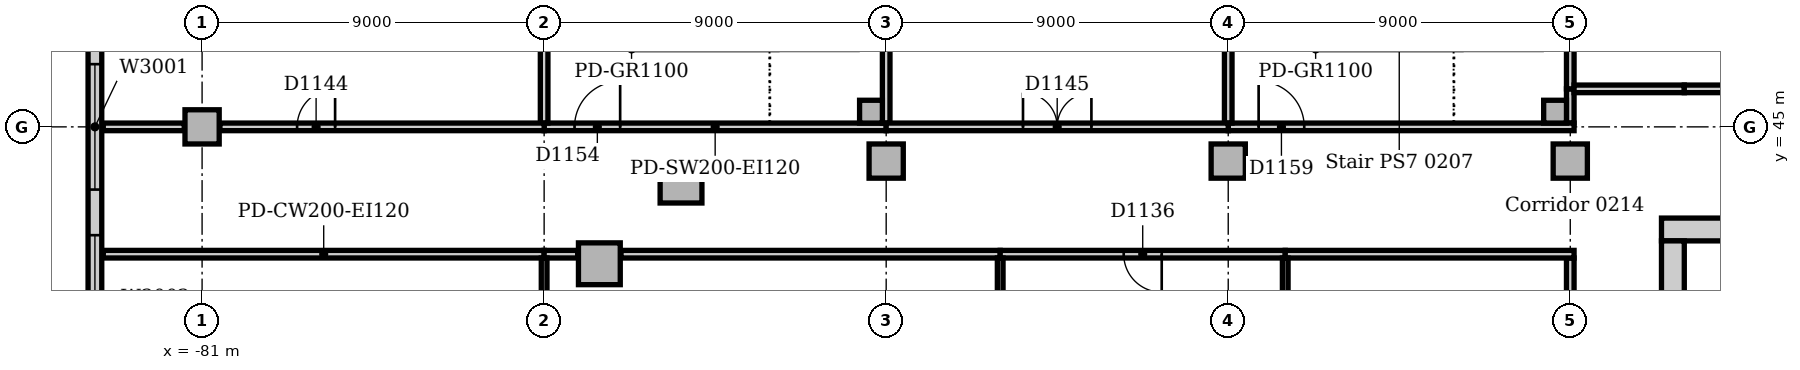
"""IFC4 building model, lengths in metres.
Left out: names, types, materials, properties, quantities, classifications, styles, units other than length and angle.
Written with IfcOpenShell. Run it as: python <this file> out.ifc"""

import sys

from ifc_helpers import new_model, si_unit, direction, frame, frame_2d, origin, origin_2d, place, context, subcontext, project, spatial, rectangle, extrude, element, fill, save


model = new_model("IFC4")
c1 = context("Model", 3, precision=1e-05, world=origin(), true_north=direction((0.0, 1.0)))
c2 = subcontext(c1, "Body", "Model", "MODEL_VIEW")
j1 = project(units=[si_unit("LENGTHUNIT", "METRE"), si_unit("PLANEANGLEUNIT", "RADIAN")], contexts=[c1])
p1 = place(None, origin())
s1 = spatial("IfcSite", under=j1, at=p1, CompositionType="ELEMENT")
p2 = place(p1, origin())
s2 = spatial("IfcBuilding", under=s1, at=p2, CompositionType="ELEMENT")
p3 = place(p2, frame((0.0, 0.0, 11.0)))
s3 = spatial("IfcBuildingStorey", under=s2, at=p3, CompositionType="ELEMENT", Elevation=11.0)
p4 = place(p3, frame((-30.9, 42.3, 0.0), z_axis=(0.0, 0.0, 1.0), x_axis=(-1.0, 0.0, 0.0)))
e1 = element("IfcWall", 1, at=p4, inside=s3, PredefinedType="SOLIDWALL", context=c2, shape_type="SweptSolid", body=[
    extrude(rectangle(XDim=11.7, YDim=0.6, at=frame_2d((5.85, 0.0))), origin(), (0.0, 0.0, 1.0), 5.0),
])
p5 = place(p3, frame((-42.3, 42.0, 0.0), z_axis=(0.0, 0.0, 1.0), x_axis=(0.0, -1.0, 0.0)))
e2 = element("IfcWall", 2, at=p5, inside=s3, PredefinedType="SOLIDWALL", context=c2, shape_type="SweptSolid", body=[
    extrude(rectangle(XDim=11.5, YDim=0.6, at=frame_2d((5.75, 0.0))), origin(), (0.0, 0.0, 1.0), 5.0),
])
p6 = place(p5, frame((8.85, 0.0, 0.0)))
e3 = element("IfcOpeningElement", 3, at=p6, cuts=e2, PredefinedType="OPENING", context=c2, shape_type="SweptSolid", body=[
    extrude(rectangle(XDim=1.8, YDim=2.1, at=frame_2d((0.9, 1.05))), frame((0.0, 0.31, 0.0), z_axis=(0.0, -1.0, 0.0), x_axis=(1.0, 0.0, 0.0)), (0.0, 0.0, 1.0), 0.62),
])
for number, where, z_axis, x_axis in (
    (4, (-68.398, 43.547, 0.0), (0.0, 0.0, 1.0), (1.0, 0.0, 0.0)),
    (5, (-70.547, 41.398, 0.0), (0.0, 0.0, 1.0), (1.0, 0.0, 0.0)),
):
    element("IfcColumn", number, at=place(p3, frame(where, z_axis=z_axis, x_axis=x_axis)), inside=s3, PredefinedType="COLUMN", context=c2, shape_type="SweptSolid", body=[
        extrude(rectangle(XDim=1.1, YDim=1.1, at=origin_2d()), origin(), (0.0, 0.0, 1.0), 4.7),
    ])
for number, where, z_axis, x_axis in (
    (6, (-63.0, 44.1, 0.0), (0.0, 0.0, 1.0), (1.0, 0.0, 0.0)),
    (7, (-54.0, 44.1, 0.0), (0.0, 0.0, 1.0), (1.0, 0.0, 0.0)),
    (8, (-45.0, 44.1, 0.0), (0.0, 0.0, 1.0), (1.0, 0.0, 0.0)),
    (9, (-81.0, 45.0, 0.0), (0.0, 0.0, 1.0), (1.0, 0.0, 0.0)),
):
    element("IfcColumn", number, at=place(p3, frame(where, z_axis=z_axis, x_axis=x_axis)), inside=s3, PredefinedType="COLUMN", context=c2, shape_type="SweptSolid", body=[
        extrude(rectangle(XDim=0.9, YDim=0.9, at=origin_2d()), origin(), (0.0, 0.0, 1.0), 4.7),
    ])
p7 = place(p3, frame((-83.82, 54.0, 0.0), z_axis=(0.0, 0.0, 1.0), x_axis=(0.0, -1.0, 0.0)))
e10 = element("IfcWall", 10, at=p7, inside=s3, PredefinedType="STANDARD", context=c2, shape_type="SweptSolid", body=[
    extrude(rectangle(XDim=63.0, YDim=0.36, at=frame_2d((31.5, 0.0))), origin(), (0.0, 0.0, 1.0), 4.7),
])
p8 = place(p7, frame((2.85, 0.0, 0.9)))
e11 = element("IfcOpeningElement", 11, at=p8, cuts=e10, PredefinedType="OPENING", context=c2, shape_type="SweptSolid", body=[
    extrude(rectangle(XDim=3.3, YDim=2.4, at=frame_2d((1.65, 1.2))), frame((0.0, 0.19, 0.0), z_axis=(0.0, -1.0, 0.0), x_axis=(1.0, 0.0, 0.0)), (0.0, 0.0, 1.0), 0.38),
])
p9 = place(p7, frame((7.35, 0.0, 0.9)))
e12 = element("IfcOpeningElement", 12, at=p9, cuts=e10, PredefinedType="OPENING", context=c2, shape_type="SweptSolid", body=[
    extrude(rectangle(XDim=3.3, YDim=2.4, at=frame_2d((1.65, 1.2))), frame((0.0, 0.19, 0.0), z_axis=(0.0, -1.0, 0.0), x_axis=(1.0, 0.0, 0.0)), (0.0, 0.0, 1.0), 0.38),
])
p10 = place(p7, frame((11.85, 0.0, 0.9)))
e13 = element("IfcOpeningElement", 13, at=p10, cuts=e10, PredefinedType="OPENING", context=c2, shape_type="SweptSolid", body=[
    extrude(rectangle(XDim=3.3, YDim=2.4, at=frame_2d((1.65, 1.2))), frame((0.0, 0.19, 0.0), z_axis=(0.0, -1.0, 0.0), x_axis=(1.0, 0.0, 0.0)), (0.0, 0.0, 1.0), 0.38),
])
p11 = place(p7, frame((16.35, 0.0, 0.9)))
e14 = element("IfcOpeningElement", 14, at=p11, cuts=e10, PredefinedType="OPENING", context=c2, shape_type="SweptSolid", body=[
    extrude(rectangle(XDim=3.3, YDim=2.4, at=frame_2d((1.65, 1.2))), frame((0.0, 0.19, 0.0), z_axis=(0.0, -1.0, 0.0), x_axis=(1.0, 0.0, 0.0)), (0.0, 0.0, 1.0), 0.38),
])
p12 = place(p7, frame((20.85, 0.0, 0.9)))
e15 = element("IfcOpeningElement", 15, at=p12, cuts=e10, PredefinedType="OPENING", context=c2, shape_type="SweptSolid", body=[
    extrude(rectangle(XDim=3.3, YDim=2.4, at=frame_2d((1.65, 1.2))), frame((0.0, 0.19, 0.0), z_axis=(0.0, -1.0, 0.0), x_axis=(1.0, 0.0, 0.0)), (0.0, 0.0, 1.0), 0.38),
])
p13 = place(p7, frame((25.35, 0.0, 0.9)))
e16 = element("IfcOpeningElement", 16, at=p13, cuts=e10, PredefinedType="OPENING", context=c2, shape_type="SweptSolid", body=[
    extrude(rectangle(XDim=3.3, YDim=2.4, at=frame_2d((1.65, 1.2))), frame((0.0, 0.19, 0.0), z_axis=(0.0, -1.0, 0.0), x_axis=(1.0, 0.0, 0.0)), (0.0, 0.0, 1.0), 0.38),
])
p14 = place(p7, frame((29.85, 0.0, 0.9)))
e17 = element("IfcOpeningElement", 17, at=p14, cuts=e10, PredefinedType="OPENING", context=c2, shape_type="SweptSolid", body=[
    extrude(rectangle(XDim=3.3, YDim=2.4, at=frame_2d((1.65, 1.2))), frame((0.0, 0.19, 0.0), z_axis=(0.0, -1.0, 0.0), x_axis=(1.0, 0.0, 0.0)), (0.0, 0.0, 1.0), 0.38),
])
p15 = place(p7, frame((34.35, 0.0, 0.9)))
e18 = element("IfcOpeningElement", 18, at=p15, cuts=e10, PredefinedType="OPENING", context=c2, shape_type="SweptSolid", body=[
    extrude(rectangle(XDim=3.3, YDim=2.4, at=frame_2d((1.65, 1.2))), frame((0.0, 0.19, 0.0), z_axis=(0.0, -1.0, 0.0), x_axis=(1.0, 0.0, 0.0)), (0.0, 0.0, 1.0), 0.38),
])
p16 = place(p7, frame((38.85, 0.0, 0.9)))
e19 = element("IfcOpeningElement", 19, at=p16, cuts=e10, PredefinedType="OPENING", context=c2, shape_type="SweptSolid", body=[
    extrude(rectangle(XDim=3.3, YDim=2.4, at=frame_2d((1.65, 1.2))), frame((0.0, 0.19, 0.0), z_axis=(0.0, -1.0, 0.0), x_axis=(1.0, 0.0, 0.0)), (0.0, 0.0, 1.0), 0.38),
])
p17 = place(p7, frame((43.35, 0.0, 0.9)))
e20 = element("IfcOpeningElement", 20, at=p17, cuts=e10, PredefinedType="OPENING", context=c2, shape_type="SweptSolid", body=[
    extrude(rectangle(XDim=3.3, YDim=2.4, at=frame_2d((1.65, 1.2))), frame((0.0, 0.19, 0.0), z_axis=(0.0, -1.0, 0.0), x_axis=(1.0, 0.0, 0.0)), (0.0, 0.0, 1.0), 0.38),
])
p18 = place(p7, frame((47.85, 0.0, 0.9)))
e21 = element("IfcOpeningElement", 21, at=p18, cuts=e10, PredefinedType="OPENING", context=c2, shape_type="SweptSolid", body=[
    extrude(rectangle(XDim=3.3, YDim=2.4, at=frame_2d((1.65, 1.2))), frame((0.0, 0.19, 0.0), z_axis=(0.0, -1.0, 0.0), x_axis=(1.0, 0.0, 0.0)), (0.0, 0.0, 1.0), 0.38),
])
p19 = place(p7, frame((52.35, 0.0, 0.9)))
e22 = element("IfcOpeningElement", 22, at=p19, cuts=e10, PredefinedType="OPENING", context=c2, shape_type="SweptSolid", body=[
    extrude(rectangle(XDim=3.3, YDim=2.4, at=frame_2d((1.65, 1.2))), frame((0.0, 0.19, 0.0), z_axis=(0.0, -1.0, 0.0), x_axis=(1.0, 0.0, 0.0)), (0.0, 0.0, 1.0), 0.38),
])
p20 = place(p7, frame((56.85, 0.0, 0.9)))
e23 = element("IfcOpeningElement", 23, at=p20, cuts=e10, PredefinedType="OPENING", context=c2, shape_type="SweptSolid", body=[
    extrude(rectangle(XDim=3.3, YDim=2.4, at=frame_2d((1.65, 1.2))), frame((0.0, 0.19, 0.0), z_axis=(0.0, -1.0, 0.0), x_axis=(1.0, 0.0, 0.0)), (0.0, 0.0, 1.0), 0.38),
])
for number, where, z_axis, x_axis in (
    (24, (-63.4, 45.4, 0.0), (0.0, 0.0, 1.0), (1.0, 0.0, 0.0)),
    (25, (-45.4, 45.4, 0.0), (0.0, 0.0, 1.0), (1.0, 0.0, 0.0)),
):
    element("IfcColumn", number, at=place(p3, frame(where, z_axis=z_axis, x_axis=x_axis)), inside=s3, PredefinedType="COLUMN", context=c2, shape_type="SweptSolid", body=[
        extrude(rectangle(XDim=0.6, YDim=0.6, at=origin_2d()), origin(), (0.0, 0.0, 1.0), 5.0),
    ])
p21 = place(p3, frame((-72.0, 45.0, 0.0), z_axis=(0.0, 0.0, 1.0), x_axis=(1.0, 0.0, 0.0)))
e26 = element("IfcWall", 26, at=p21, inside=s3, PredefinedType="SOLIDWALL", context=c2, shape_type="SweptSolid", body=[
    extrude(rectangle(XDim=9.0, YDim=0.2, at=frame_2d((4.5, 0.0))), origin(), (0.0, 0.0, 1.0), 4.7),
])
p22 = place(p21, frame((0.8, 0.0, 0.0)))
e27 = element("IfcOpeningElement", 27, at=p22, cuts=e26, PredefinedType="OPENING", context=c2, shape_type="SweptSolid", body=[
    extrude(rectangle(XDim=1.2, YDim=2.1, at=frame_2d((0.6, 1.05))), frame((0.0, 0.11, 0.0), z_axis=(0.0, -1.0, 0.0), x_axis=(1.0, 0.0, 0.0)), (0.0, 0.0, 1.0), 0.22),
])
p23 = place(p3, frame((-72.0, 45.1, 0.0), z_axis=(0.0, 0.0, 1.0), x_axis=(0.0, 1.0, 0.0)))
e28 = element("IfcWall", 28, at=p23, inside=s3, PredefinedType="SOLIDWALL", context=c2, shape_type="SweptSolid", body=[
    extrude(rectangle(XDim=5.25, YDim=0.2, at=frame_2d((2.625, 0.0))), origin(), (0.0, 0.0, 1.0), 4.7),
])
p24 = place(p3, frame((-63.0, 45.1, 0.0), z_axis=(0.0, 0.0, 1.0), x_axis=(0.0, 1.0, 0.0)))
e29 = element("IfcWall", 29, at=p24, inside=s3, PredefinedType="SOLIDWALL", context=c2, shape_type="SweptSolid", body=[
    extrude(rectangle(XDim=5.15, YDim=0.2, at=frame_2d((2.575, 0.0))), origin(), (0.0, 0.0, 1.0), 4.7),
])
p25 = place(p3, frame((-45.0, 45.1, 0.0), z_axis=(0.0, 0.0, 1.0), x_axis=(0.0, 1.0, 0.0)))
e30 = element("IfcWall", 30, at=p25, inside=s3, PredefinedType="SOLIDWALL", context=c2, shape_type="SweptSolid", body=[
    extrude(rectangle(XDim=0.9, YDim=0.2, at=frame_2d((0.45, 0.0))), origin(), (0.0, 0.0, 1.0), 4.7),
])
p26 = place(p3, frame((-54.0, 45.0, 0.0), z_axis=(0.0, 0.0, 1.0), x_axis=(1.0, 0.0, 0.0)))
e31 = element("IfcWall", 31, at=p26, inside=s3, PredefinedType="SOLIDWALL", context=c2, shape_type="SweptSolid", body=[
    extrude(rectangle(XDim=9.1, YDim=0.2, at=frame_2d((4.55, 0.0))), origin(), (0.0, 0.0, 1.0), 4.7),
])
p27 = place(p26, frame((0.8, 0.0, 0.0)))
e32 = element("IfcOpeningElement", 32, at=p27, cuts=e31, PredefinedType="OPENING", context=c2, shape_type="SweptSolid", body=[
    extrude(rectangle(XDim=1.2, YDim=2.1, at=frame_2d((0.6, 1.05))), frame((0.0, 0.11, 0.0), z_axis=(0.0, -1.0, 0.0), x_axis=(1.0, 0.0, 0.0)), (0.0, 0.0, 1.0), 0.22),
])
p28 = place(p3, frame((-54.0, 45.1, 0.0), z_axis=(0.0, 0.0, 1.0), x_axis=(0.0, 1.0, 0.0)))
e33 = element("IfcWall", 33, at=p28, inside=s3, PredefinedType="SOLIDWALL", context=c2, shape_type="SweptSolid", body=[
    extrude(rectangle(XDim=5.15, YDim=0.2, at=frame_2d((2.575, 0.0))), origin(), (0.0, 0.0, 1.0), 4.7),
])
p29 = place(p3, frame((-45.0, 46.0, 0.0), z_axis=(0.0, 0.0, 1.0), x_axis=(0.0, 1.0, 0.0)))
e34 = element("IfcWall", 34, at=p29, inside=s3, PredefinedType="SOLIDWALL", context=c2, shape_type="SweptSolid", body=[
    extrude(rectangle(XDim=4.35, YDim=0.2, at=frame_2d((2.175, 0.0))), origin(), (0.0, 0.0, 1.0), 4.7),
])
p30 = place(p3, frame((-45.0, 36.42, 0.0), z_axis=(0.0, 0.0, 1.0), x_axis=(0.0, 1.0, 0.0)))
e35 = element("IfcWall", 35, at=p30, inside=s3, PredefinedType="PARTITIONING", context=c2, shape_type="SweptSolid", body=[
    extrude(rectangle(XDim=5.13, YDim=0.2, at=frame_2d((2.565, 0.0))), origin(), (0.0, 0.0, 1.0), 4.7),
])
p31 = place(p3, frame((-83.6, 41.65, 0.0), z_axis=(0.0, 0.0, 1.0), x_axis=(1.0, 0.0, 0.0)))
e36 = element("IfcWall", 36, at=p31, inside=s3, PredefinedType="PARTITIONING", context=c2, shape_type="SweptSolid", body=[
    extrude(rectangle(XDim=11.6, YDim=0.2, at=frame_2d((5.8, 0.0))), origin(), (0.0, 0.0, 1.0), 4.7),
])
p32 = place(p3, frame((-72.0, 41.65, 0.0), z_axis=(0.0, 0.0, 1.0), x_axis=(1.0, 0.0, 0.0)))
e37 = element("IfcWall", 37, at=p32, inside=s3, PredefinedType="PARTITIONING", context=c2, shape_type="SweptSolid", body=[
    extrude(rectangle(XDim=0.883, YDim=0.2, at=frame_2d((0.442, 0.0))), origin(), (0.0, 0.0, 1.0), 4.7),
])
p33 = place(p3, frame((-69.977, 41.65, 0.0), z_axis=(0.0, 0.0, 1.0), x_axis=(1.0, 0.0, 0.0)))
e38 = element("IfcWall", 38, at=p33, inside=s3, PredefinedType="PARTITIONING", context=c2, shape_type="SweptSolid", body=[
    extrude(rectangle(XDim=9.977, YDim=0.2, at=frame_2d((4.989, 0.0))), origin(), (0.0, 0.0, 1.0), 4.7),
])
p34 = place(p3, frame((-60.0, 41.65, 0.0), z_axis=(0.0, 0.0, 1.0), x_axis=(1.0, 0.0, 0.0)))
e39 = element("IfcWall", 39, at=p34, inside=s3, PredefinedType="PARTITIONING", context=c2, shape_type="SweptSolid", body=[
    extrude(rectangle(XDim=7.5, YDim=0.2, at=frame_2d((3.75, 0.0))), origin(), (0.0, 0.0, 1.0), 4.7),
])
p35 = place(p34, frame((3.25, 0.0, 0.0)))
e40 = element("IfcOpeningElement", 40, at=p35, cuts=e39, PredefinedType="OPENING", context=c2, shape_type="SweptSolid", body=[
    extrude(rectangle(XDim=1.0, YDim=2.1, at=frame_2d((0.5, 1.05))), frame((0.0, 0.11, 0.0), z_axis=(0.0, -1.0, 0.0), x_axis=(1.0, 0.0, 0.0)), (0.0, 0.0, 1.0), 0.22),
])
p36 = place(p3, frame((-52.5, 41.65, 0.0), z_axis=(0.0, 0.0, 1.0), x_axis=(1.0, 0.0, 0.0)))
e41 = element("IfcWall", 41, at=p36, inside=s3, PredefinedType="PARTITIONING", context=c2, shape_type="SweptSolid", body=[
    extrude(rectangle(XDim=7.6, YDim=0.2, at=frame_2d((3.8, 0.0))), origin(), (0.0, 0.0, 1.0), 4.7),
])
p37 = place(p3, frame((-83.6, 45.0, 0.0), z_axis=(0.0, 0.0, 1.0), x_axis=(1.0, 0.0, 0.0)))
e42 = element("IfcWall", 42, at=p37, inside=s3, PredefinedType="PARTITIONING", context=c2, shape_type="SweptSolid", body=[
    extrude(rectangle(XDim=2.13, YDim=0.2, at=frame_2d((1.065, 0.0))), origin(), (0.0, 0.0, 1.0), 4.7),
])
p38 = place(p3, frame((-80.53, 45.0, 0.0), z_axis=(0.0, 0.0, 1.0), x_axis=(1.0, 0.0, 0.0)))
e43 = element("IfcWall", 43, at=p38, inside=s3, PredefinedType="PARTITIONING", context=c2, shape_type="SweptSolid", body=[
    extrude(rectangle(XDim=8.53, YDim=0.2, at=frame_2d((4.265, 0.0))), origin(), (0.0, 0.0, 1.0), 4.7),
])
p39 = place(p38, frame((2.03, 0.0, 0.0)))
e44 = element("IfcOpeningElement", 44, at=p39, cuts=e43, PredefinedType="OPENING", context=c2, shape_type="SweptSolid", body=[
    extrude(rectangle(XDim=1.0, YDim=2.1, at=frame_2d((0.5, 1.05))), frame((0.0, 0.11, 0.0), z_axis=(0.0, -1.0, 0.0), x_axis=(1.0, 0.0, 0.0)), (0.0, 0.0, 1.0), 0.22),
])
p40 = place(p3, frame((-63.0, 45.0, 0.0), z_axis=(0.0, 0.0, 1.0), x_axis=(1.0, 0.0, 0.0)))
e45 = element("IfcWall", 45, at=p40, inside=s3, PredefinedType="PARTITIONING", context=c2, shape_type="SweptSolid", body=[
    extrude(rectangle(XDim=9.0, YDim=0.2, at=frame_2d((4.5, 0.0))), origin(), (0.0, 0.0, 1.0), 4.7),
])
p41 = place(p40, frame((3.6, 0.0, 0.0)))
e46 = element("IfcOpeningElement", 46, at=p41, cuts=e45, PredefinedType="OPENING", context=c2, shape_type="SweptSolid", body=[
    extrude(rectangle(XDim=1.8, YDim=2.1, at=frame_2d((0.9, 1.05))), frame((0.0, 0.11, 0.0), z_axis=(0.0, -1.0, 0.0), x_axis=(1.0, 0.0, 0.0)), (0.0, 0.0, 1.0), 0.22),
])
p42 = place(p3, frame((-44.9, 46.0, 0.0), z_axis=(0.0, 0.0, 1.0), x_axis=(1.0, 0.0, 0.0)))
e47 = element("IfcWall", 47, at=p42, inside=s3, PredefinedType="PARTITIONING", context=c2, shape_type="SweptSolid", body=[
    extrude(rectangle(XDim=2.9, YDim=0.2, at=frame_2d((1.45, 0.0))), origin(), (0.0, 0.0, 1.0), 4.7),
])
p43 = place(p3, frame((-42.0, 46.0, 0.0), z_axis=(0.0, 0.0, 1.0), x_axis=(1.0, 0.0, 0.0)))
e48 = element("IfcWall", 48, at=p43, inside=s3, PredefinedType="PARTITIONING", context=c2, shape_type="SweptSolid", body=[
    extrude(rectangle(XDim=6.0, YDim=0.2, at=frame_2d((3.0, 0.0))), origin(), (0.0, 0.0, 1.0), 4.7),
])
p44 = place(p43, frame((2.5, 0.0, 0.0)))
e49 = element("IfcOpeningElement", 49, at=p44, cuts=e48, PredefinedType="OPENING", context=c2, shape_type="SweptSolid", body=[
    extrude(rectangle(XDim=1.0, YDim=2.1, at=frame_2d((0.5, 1.05))), frame((0.0, 0.11, 0.0), z_axis=(0.0, -1.0, 0.0), x_axis=(1.0, 0.0, 0.0)), (0.0, 0.0, 1.0), 0.22),
])
p45 = place(p3, frame((-72.0, 24.1, 0.0), z_axis=(0.0, 0.0, 1.0), x_axis=(0.0, 1.0, 0.0)))
e50 = element("IfcWall", 50, at=p45, inside=s3, PredefinedType="PARTITIONING", context=c2, shape_type="SweptSolid", body=[
    extrude(rectangle(XDim=17.45, YDim=0.15, at=frame_2d((8.725, 0.0))), origin(), (0.0, 0.0, 1.0), 4.7),
])
for number, where, z_axis, x_axis in (
    (51, (-60.0, 33.75, 0.0), (0.0, 0.0, 1.0), (0.0, 1.0, 0.0)),
    (52, (-52.5, 33.75, 0.0), (0.0, 0.0, 1.0), (0.0, 1.0, 0.0)),
):
    element("IfcWall", number, at=place(p3, frame(where, z_axis=z_axis, x_axis=x_axis)), inside=s3, PredefinedType="PARTITIONING", context=c2, shape_type="SweptSolid", body=[
        extrude(rectangle(XDim=7.8, YDim=0.15, at=frame_2d((3.9, 0.0))), origin(), (0.0, 0.0, 1.0), 4.7),
    ])
p46 = place(p9, origin())
e53 = element("IfcWindow", 53, at=p46, inside=s3, PartitioningType="SINGLE_PANEL", PredefinedType="WINDOW", context=c2, shape_type="SweptSolid", body=[
    extrude(rectangle(XDim=3.3, YDim=2.4, at=frame_2d((1.65, 1.2))), frame((0.0, 0.13, 0.0), z_axis=(0.0, -1.0, 0.0), x_axis=(1.0, 0.0, 0.0)), (0.0, 0.0, 1.0), 0.06),
])
fill(e12, e53)
p47 = place(p10, origin())
e54 = element("IfcWindow", 54, at=p47, inside=s3, PartitioningType="SINGLE_PANEL", PredefinedType="WINDOW", context=c2, shape_type="SweptSolid", body=[
    extrude(rectangle(XDim=3.3, YDim=2.4, at=frame_2d((1.65, 1.2))), frame((0.0, 0.13, 0.0), z_axis=(0.0, -1.0, 0.0), x_axis=(1.0, 0.0, 0.0)), (0.0, 0.0, 1.0), 0.06),
])
fill(e13, e54)
p48 = place(p35, frame((1.0, 0.0, 0.0), z_axis=(0.0, 0.0, 1.0), x_axis=(-1.0, 0.0, 0.0)))
e55 = element("IfcDoor", 55, at=p48, inside=s3, OperationType="SINGLE_SWING_LEFT", PredefinedType="DOOR", context=c2, shape_type="SweptSolid", body=[
    extrude(rectangle(XDim=1.0, YDim=2.1, at=frame_2d((0.5, 1.05))), frame((0.0, 0.025, 0.0), z_axis=(0.0, -1.0, 0.0), x_axis=(1.0, 0.0, 0.0)), (0.0, 0.0, 1.0), 0.05),
])
fill(e40, e55)
p49 = place(p39, origin())
e56 = element("IfcDoor", 56, at=p49, inside=s3, OperationType="SINGLE_SWING_RIGHT", PredefinedType="DOOR", context=c2, shape_type="SweptSolid", body=[
    extrude(rectangle(XDim=1.0, YDim=2.1, at=frame_2d((0.5, 1.05))), frame((0.0, 0.025, 0.0), z_axis=(0.0, -1.0, 0.0), x_axis=(1.0, 0.0, 0.0)), (0.0, 0.0, 1.0), 0.05),
])
fill(e44, e56)
p50 = place(p41, origin())
e57 = element("IfcDoor", 57, at=p50, inside=s3, OperationType="DOUBLE_DOOR_SINGLE_SWING", PredefinedType="DOOR", context=c2, shape_type="SweptSolid", body=[
    extrude(rectangle(XDim=1.8, YDim=2.1, at=frame_2d((0.9, 1.05))), frame((0.0, 0.025, 0.0), z_axis=(0.0, -1.0, 0.0), x_axis=(1.0, 0.0, 0.0)), (0.0, 0.0, 1.0), 0.05),
])
fill(e46, e57)
p51 = place(p22, origin())
e58 = element("IfcDoor", 58, at=p51, inside=s3, OperationType="SINGLE_SWING_RIGHT", PredefinedType="DOOR", context=c2, shape_type="SweptSolid", body=[
    extrude(rectangle(XDim=1.2, YDim=2.1, at=frame_2d((0.6, 1.05))), frame((0.0, 0.025, 0.0), z_axis=(0.0, -1.0, 0.0), x_axis=(1.0, 0.0, 0.0)), (0.0, 0.0, 1.0), 0.05),
])
fill(e27, e58)
p52 = place(p27, origin())
e59 = element("IfcDoor", 59, at=p52, inside=s3, OperationType="SINGLE_SWING_LEFT", PredefinedType="DOOR", context=c2, shape_type="SweptSolid", body=[
    extrude(rectangle(XDim=1.2, YDim=2.1, at=frame_2d((0.6, 1.05))), frame((0.0, 0.025, 0.0), z_axis=(0.0, -1.0, 0.0), x_axis=(1.0, 0.0, 0.0)), (0.0, 0.0, 1.0), 0.05),
])
fill(e32, e59)
save(model, sys.argv[1])
